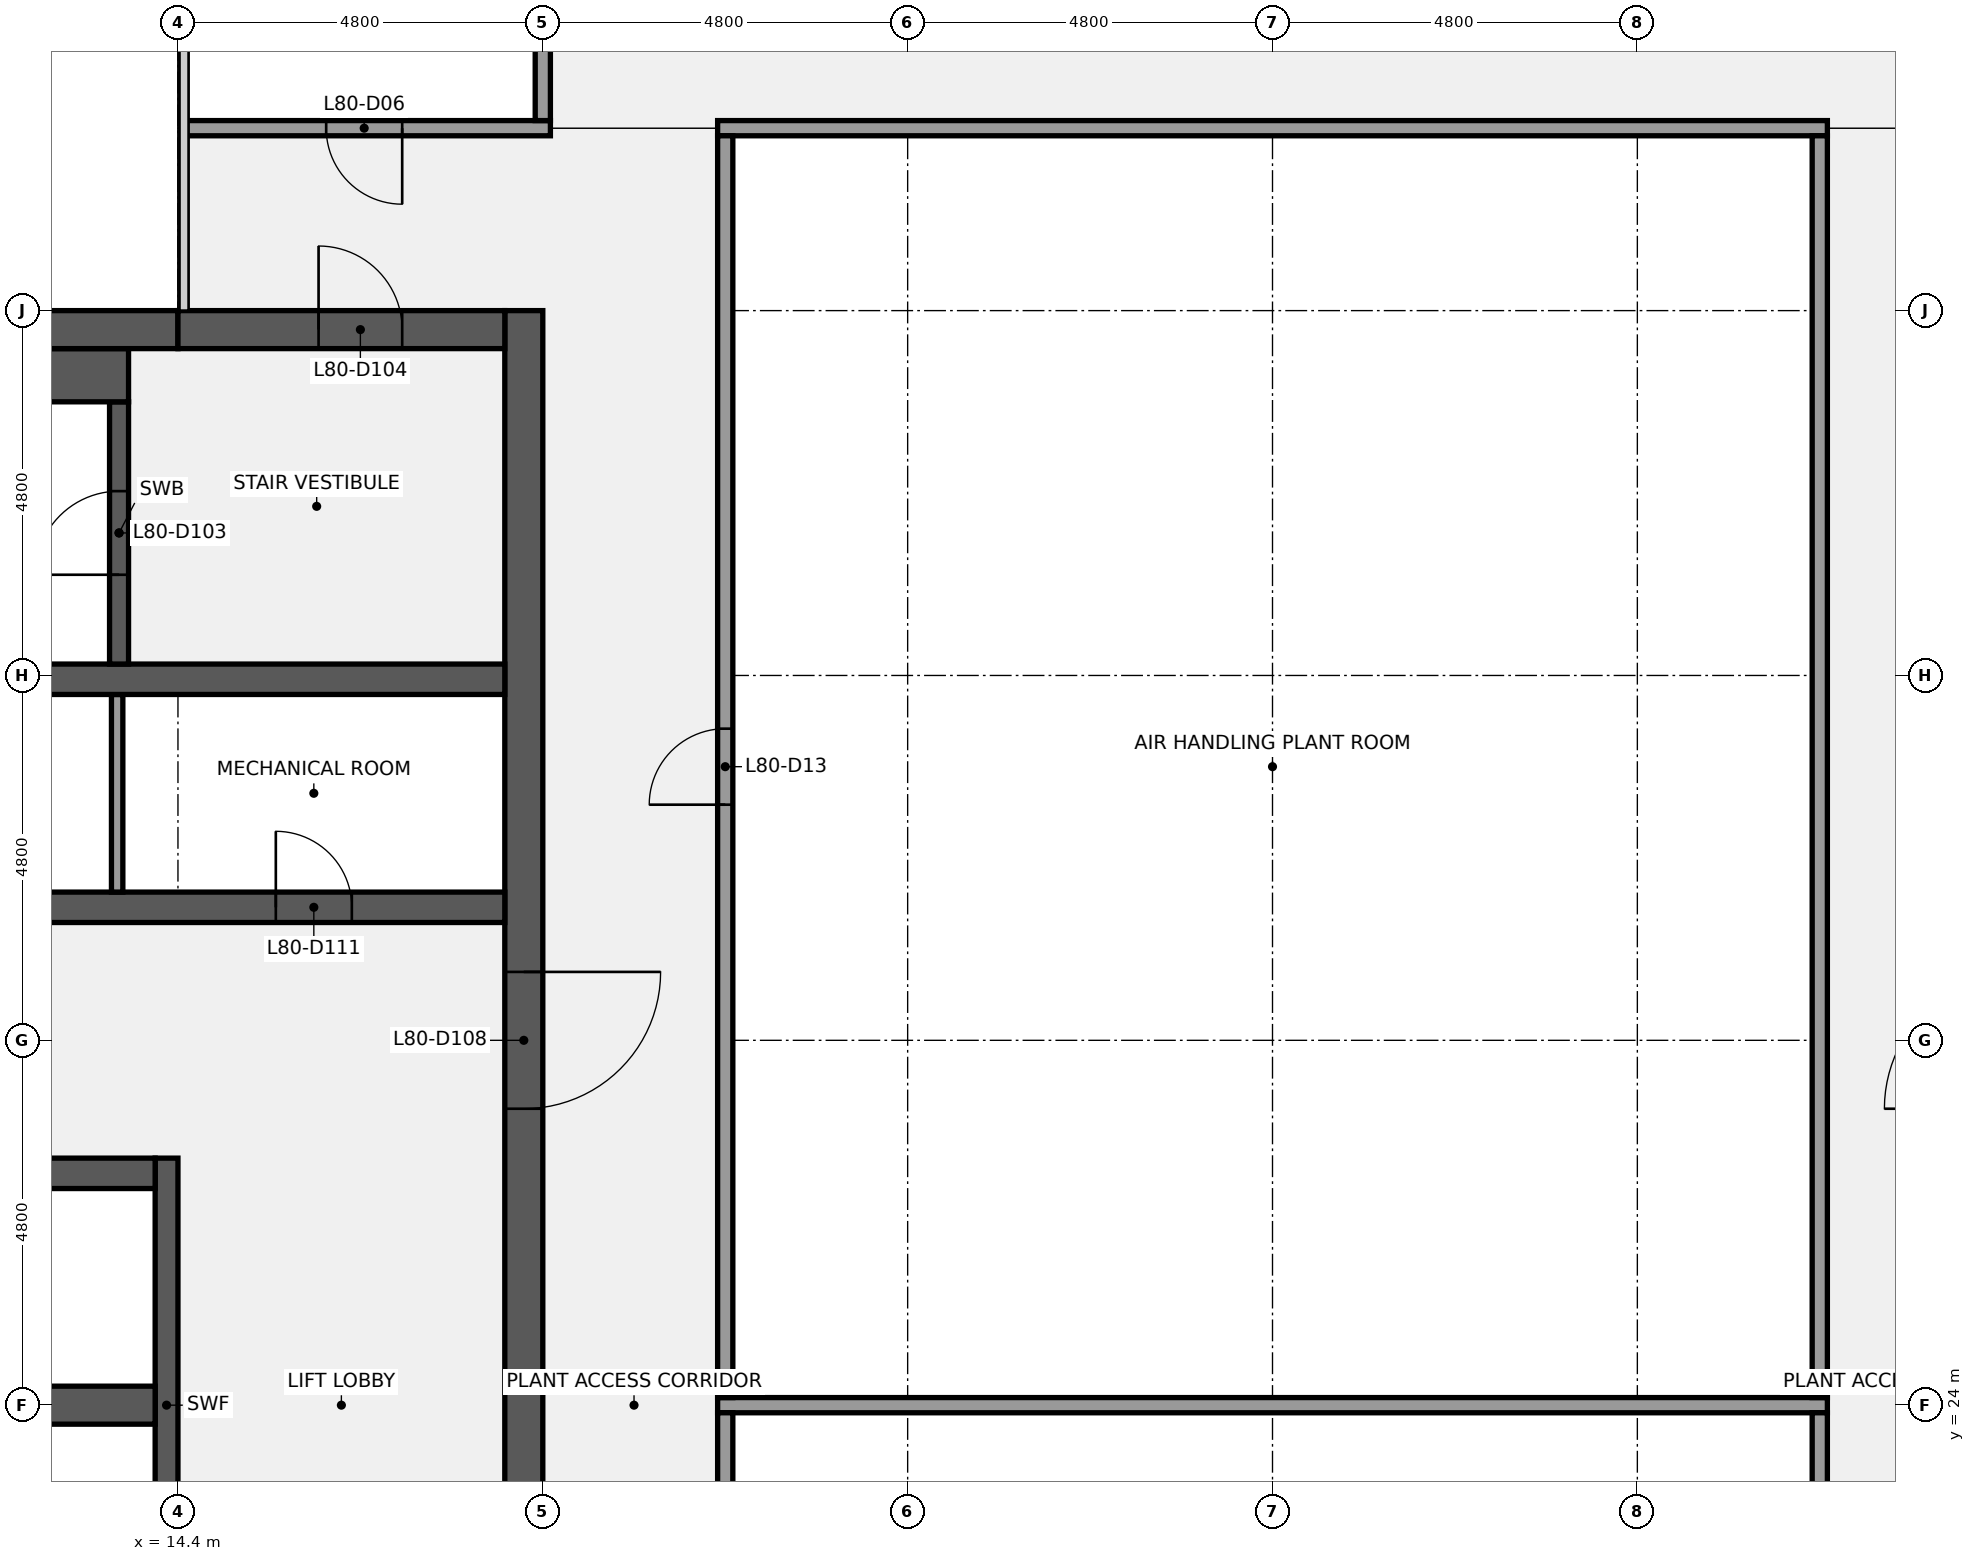
"""IFC4 building model, lengths in metres.
Left out: names, types, materials, properties, quantities, classifications, styles, units other than length and angle.
Written with IfcOpenShell. Run it as: python <this file> out.ifc"""

import sys

from ifc_helpers import new_model, si_unit, direction, frame, frame_2d, origin, place, context, subcontext, project, spatial, rectangle, extrude, element, fill, save


model = new_model("IFC4")
c1 = context("Model", 3, precision=1e-05, world=origin(), true_north=direction((0.0, 1.0)))
c2 = subcontext(c1, "Body", "Model", "MODEL_VIEW")
j1 = project(units=[si_unit("LENGTHUNIT", "METRE"), si_unit("PLANEANGLEUNIT", "RADIAN")], contexts=[c1])
p1 = place(None, origin())
s1 = spatial("IfcSite", under=j1, at=p1, CompositionType="ELEMENT")
p2 = place(p1, origin())
s2 = spatial("IfcBuilding", under=s1, at=p2, CompositionType="ELEMENT")
p3 = place(p2, frame((0.0, 0.0, 358.3)))
s3 = spatial("IfcBuildingStorey", under=s2, at=p3, CompositionType="ELEMENT", Elevation=358.3)
p4 = place(p3, frame((18.95, 38.4, 0.0), z_axis=(0.0, 0.0, 1.0), x_axis=(0.0, -1.0, 0.0)))
e1 = element("IfcWall", 1, at=p4, inside=s3, PredefinedType="SHEAR", context=c2, shape_type="SweptSolid", body=[
    extrude(rectangle(XDim=28.8, YDim=0.5, at=frame_2d((14.4, 0.0))), origin(), (0.0, 0.0, 1.0), 3.75),
])
p5 = place(p4, frame((18.3, 0.0, 0.0)))
e2 = element("IfcOpeningElement", 2, at=p5, cuts=e1, PredefinedType="OPENING", context=c2, shape_type="SweptSolid", body=[
    extrude(rectangle(XDim=1.8, YDim=2.1, at=frame_2d((0.9, 1.05))), frame((0.0, 0.26, 0.0), z_axis=(0.0, -1.0, 0.0), x_axis=(1.0, 0.0, 0.0)), (0.0, 0.0, 1.0), 0.52),
])
p6 = place(p4, frame((8.7, 0.0, 0.0)))
e3 = element("IfcOpeningElement", 3, at=p6, cuts=e1, PredefinedType="OPENING", context=c2, shape_type="SweptSolid", body=[
    extrude(rectangle(XDim=1.8, YDim=2.1, at=frame_2d((0.9, 1.05))), frame((0.0, 0.26, 0.0), z_axis=(0.0, -1.0, 0.0), x_axis=(1.0, 0.0, 0.0)), (0.0, 0.0, 1.0), 0.52),
])
p7 = place(p3, frame((14.25, 20.75, 0.0), z_axis=(0.0, 0.0, 1.0), x_axis=(0.0, 1.0, 0.0)))
e4 = element("IfcWall", 4, at=p7, inside=s3, PredefinedType="SHEAR", context=c2, shape_type="SweptSolid", body=[
    extrude(rectangle(XDim=6.5, YDim=0.3, at=frame_2d((3.25, 0.0))), origin(), (0.0, 0.0, 1.0), 3.75),
])
p8 = place(p3, frame((0.5, 24.0, 0.0), z_axis=(0.0, 0.0, 1.0), x_axis=(1.0, 0.0, 0.0)))
e5 = element("IfcWall", 5, at=p8, inside=s3, PredefinedType="SHEAR", context=c2, shape_type="SweptSolid", body=[
    extrude(rectangle(XDim=13.6, YDim=0.5, at=frame_2d((6.8, 0.0))), origin(), (0.0, 0.0, 1.0), 3.75),
])
p9 = place(p3, frame((0.5, 27.05, 0.0), z_axis=(0.0, 0.0, 1.0), x_axis=(1.0, 0.0, 0.0)))
e6 = element("IfcWall", 6, at=p9, inside=s3, PredefinedType="SHEAR", context=c2, shape_type="SweptSolid", body=[
    extrude(rectangle(XDim=13.6, YDim=0.4, at=frame_2d((6.8, 0.0))), origin(), (0.0, 0.0, 1.0), 3.75),
])
p10 = place(p9, frame((3.9, 0.0, 0.0)))
e7 = element("IfcOpeningElement", 7, at=p10, cuts=e6, PredefinedType="OPENING", context=c2, shape_type="SweptSolid", body=[
    extrude(rectangle(XDim=1.0, YDim=2.1, at=frame_2d((0.5, 1.05))), frame((0.0, 0.21, 0.0), z_axis=(0.0, -1.0, 0.0), x_axis=(1.0, 0.0, 0.0)), (0.0, 0.0, 1.0), 0.42),
])
p11 = place(p9, frame((10.9, 0.0, 0.0)))
e8 = element("IfcOpeningElement", 8, at=p11, cuts=e6, PredefinedType="OPENING", context=c2, shape_type="SweptSolid", body=[
    extrude(rectangle(XDim=1.2, YDim=2.1, at=frame_2d((0.6, 1.05))), frame((0.0, 0.21, 0.0), z_axis=(0.0, -1.0, 0.0), x_axis=(1.0, 0.0, 0.0)), (0.0, 0.0, 1.0), 0.42),
])
p12 = place(p3, frame((0.5, 30.55, 0.0), z_axis=(0.0, 0.0, 1.0), x_axis=(1.0, 0.0, 0.0)))
e9 = element("IfcWall", 9, at=p12, inside=s3, PredefinedType="SHEAR", context=c2, shape_type="SweptSolid", body=[
    extrude(rectangle(XDim=18.2, YDim=0.4, at=frame_2d((9.1, 0.0))), origin(), (0.0, 0.0, 1.0), 3.75),
])
p13 = place(p12, frame((3.613, 0.0, 0.0)))
e10 = element("IfcOpeningElement", 10, at=p13, cuts=e9, PredefinedType="OPENING", context=c2, shape_type="SweptSolid", body=[
    extrude(rectangle(XDim=1.0, YDim=2.1, at=frame_2d((0.5, 1.05))), frame((0.0, 0.21, 0.0), z_axis=(0.0, -1.0, 0.0), x_axis=(1.0, 0.0, 0.0)), (0.0, 0.0, 1.0), 0.42),
])
p14 = place(p12, frame((10.2, 0.0, 0.0)))
e11 = element("IfcOpeningElement", 11, at=p14, cuts=e9, PredefinedType="OPENING", context=c2, shape_type="SweptSolid", body=[
    extrude(rectangle(XDim=1.0, YDim=2.1, at=frame_2d((0.5, 1.05))), frame((0.0, 0.21, 0.0), z_axis=(0.0, -1.0, 0.0), x_axis=(1.0, 0.0, 0.0)), (0.0, 0.0, 1.0), 0.42),
])
p15 = place(p12, frame((15.188, 0.0, 0.0)))
e12 = element("IfcOpeningElement", 12, at=p15, cuts=e9, PredefinedType="OPENING", context=c2, shape_type="SweptSolid", body=[
    extrude(rectangle(XDim=1.0, YDim=2.1, at=frame_2d((0.5, 1.05))), frame((0.0, 0.21, 0.0), z_axis=(0.0, -1.0, 0.0), x_axis=(1.0, 0.0, 0.0)), (0.0, 0.0, 1.0), 0.42),
])
p16 = place(p3, frame((13.6, 30.75, 0.0), z_axis=(0.0, 0.0, 1.0), x_axis=(0.0, 1.0, 0.0)))
e13 = element("IfcWall", 13, at=p16, inside=s3, PredefinedType="PARTITIONING", context=c2, shape_type="SweptSolid", body=[
    extrude(rectangle(XDim=2.6, YDim=0.15, at=frame_2d((1.3, 0.0))), origin(), (0.0, 0.0, 1.0), 3.75),
])
p17 = place(p3, frame((0.5, 33.55, 0.0), z_axis=(0.0, 0.0, 1.0), x_axis=(1.0, 0.0, 0.0)))
e14 = element("IfcWall", 14, at=p17, inside=s3, PredefinedType="SHEAR", context=c2, shape_type="SweptSolid", body=[
    extrude(rectangle(XDim=18.2, YDim=0.4, at=frame_2d((9.1, 0.0))), origin(), (0.0, 0.0, 1.0), 3.75),
])
p18 = place(p3, frame((13.625, 33.75, 0.0), z_axis=(0.0, 0.0, 1.0), x_axis=(0.0, 1.0, 0.0)))
e15 = element("IfcWall", 15, at=p18, inside=s3, PredefinedType="SHEAR", context=c2, shape_type="SweptSolid", body=[
    extrude(rectangle(XDim=3.45, YDim=0.25, at=frame_2d((1.725, 0.0))), origin(), (0.0, 0.0, 1.0), 3.75),
])
p19 = place(p18, frame((1.175, 0.0, 0.0)))
e16 = element("IfcOpeningElement", 16, at=p19, cuts=e15, PredefinedType="OPENING", context=c2, shape_type="SweptSolid", body=[
    extrude(rectangle(XDim=1.1, YDim=2.1, at=frame_2d((0.55, 1.05))), frame((0.0, 0.135, 0.0), z_axis=(0.0, -1.0, 0.0), x_axis=(1.0, 0.0, 0.0)), (0.0, 0.0, 1.0), 0.27),
])
p20 = place(p3, frame((6.25, 37.55, 0.0), z_axis=(0.0, 0.0, 1.0), x_axis=(1.0, 0.0, 0.0)))
e17 = element("IfcWall", 17, at=p20, inside=s3, PredefinedType="SHEAR", context=c2, shape_type="SweptSolid", body=[
    extrude(rectangle(XDim=7.5, YDim=0.7, at=frame_2d((3.75, 0.0))), origin(), (0.0, 0.0, 1.0), 3.75),
])
p21 = place(p3, frame((0.5, 38.15, 0.0), z_axis=(0.0, 0.0, 1.0), x_axis=(1.0, 0.0, 0.0)))
e18 = element("IfcWall", 18, at=p21, inside=s3, PredefinedType="SHEAR", context=c2, shape_type="SweptSolid", body=[
    extrude(rectangle(XDim=13.9, YDim=0.5, at=frame_2d((6.95, 0.0))), origin(), (0.0, 0.0, 1.0), 3.75),
])
p22 = place(p3, frame((14.4, 38.15, 0.0), z_axis=(0.0, 0.0, 1.0), x_axis=(1.0, 0.0, 0.0)))
e19 = element("IfcWall", 19, at=p22, inside=s3, PredefinedType="SHEAR", context=c2, shape_type="SweptSolid", body=[
    extrude(rectangle(XDim=4.3, YDim=0.5, at=frame_2d((2.15, 0.0))), origin(), (0.0, 0.0, 1.0), 3.75),
])
p23 = place(p22, frame((1.85, 0.0, 0.0)))
e20 = element("IfcOpeningElement", 20, at=p23, cuts=e19, PredefinedType="OPENING", context=c2, shape_type="SweptSolid", body=[
    extrude(rectangle(XDim=1.1, YDim=2.1, at=frame_2d((0.55, 1.05))), frame((0.0, 0.26, 0.0), z_axis=(0.0, -1.0, 0.0), x_axis=(1.0, 0.0, 0.0)), (0.0, 0.0, 1.0), 0.52),
])
p24 = place(p3, frame((21.5, 24.0, 0.0), z_axis=(0.0, 0.0, 1.0), x_axis=(1.0, 0.0, 0.0)))
e21 = element("IfcWall", 21, at=p24, inside=s3, PredefinedType="PARTITIONING", context=c2, shape_type="SweptSolid", body=[
    extrude(rectangle(XDim=14.6, YDim=0.2, at=frame_2d((7.3, 0.0))), origin(), (0.0, 0.0, 1.0), 2.759),
])
p25 = place(p3, frame((14.5, 40.8, 0.0), z_axis=(0.0, 0.0, 1.0), x_axis=(1.0, 0.0, 0.0)))
e22 = element("IfcWall", 22, at=p25, inside=s3, PredefinedType="PARTITIONING", context=c2, shape_type="SweptSolid", body=[
    extrude(rectangle(XDim=4.8, YDim=0.2, at=frame_2d((2.4, 0.0))), origin(), (0.0, 0.0, 1.0), 2.759),
])
p26 = place(p25, frame((1.85, 0.0, 0.0)))
e23 = element("IfcOpeningElement", 23, at=p26, cuts=e22, PredefinedType="OPENING", context=c2, shape_type="SweptSolid", body=[
    extrude(rectangle(XDim=1.0, YDim=2.1, at=frame_2d((0.5, 1.05))), frame((0.0, 0.11, 0.0), z_axis=(0.0, -1.0, 0.0), x_axis=(1.0, 0.0, 0.0)), (0.0, 0.0, 1.0), 0.22),
])
p27 = place(p3, frame((21.5, 40.8, 0.0), z_axis=(0.0, 0.0, 1.0), x_axis=(1.0, 0.0, 0.0)))
e24 = element("IfcWall", 24, at=p27, inside=s3, PredefinedType="PARTITIONING", context=c2, shape_type="SweptSolid", body=[
    extrude(rectangle(XDim=14.6, YDim=0.2, at=frame_2d((7.3, 0.0))), origin(), (0.0, 0.0, 1.0), 2.759),
])
p28 = place(p3, frame((19.2, 40.9, 0.0), z_axis=(0.0, 0.0, 1.0), x_axis=(0.0, 1.0, 0.0)))
e25 = element("IfcWall", 25, at=p28, inside=s3, PredefinedType="PARTITIONING", context=c2, shape_type="SweptSolid", body=[
    extrude(rectangle(XDim=2.2, YDim=0.2, at=frame_2d((1.1, 0.0))), origin(), (0.0, 0.0, 1.0), 2.759),
])
p29 = place(p3, frame((21.6, 14.5, 0.0), z_axis=(0.0, 0.0, 1.0), x_axis=(0.0, 1.0, 0.0)))
e26 = element("IfcWall", 26, at=p29, inside=s3, PredefinedType="PARTITIONING", context=c2, shape_type="SweptSolid", body=[
    extrude(rectangle(XDim=9.4, YDim=0.2, at=frame_2d((4.7, 0.0))), origin(), (0.0, 0.0, 1.0), 2.759),
])
p30 = place(p29, frame((4.2, 0.0, 0.0)))
e27 = element("IfcOpeningElement", 27, at=p30, cuts=e26, PredefinedType="OPENING", context=c2, shape_type="SweptSolid", body=[
    extrude(rectangle(XDim=1.0, YDim=2.1, at=frame_2d((0.5, 1.05))), frame((0.0, 0.11, 0.0), z_axis=(0.0, -1.0, 0.0), x_axis=(1.0, 0.0, 0.0)), (0.0, 0.0, 1.0), 0.22),
])
p31 = place(p3, frame((21.6, 24.1, 0.0), z_axis=(0.0, 0.0, 1.0), x_axis=(0.0, 1.0, 0.0)))
e28 = element("IfcWall", 28, at=p31, inside=s3, PredefinedType="PARTITIONING", context=c2, shape_type="SweptSolid", body=[
    extrude(rectangle(XDim=16.6, YDim=0.2, at=frame_2d((8.3, 0.0))), origin(), (0.0, 0.0, 1.0), 2.759),
])
p32 = place(p31, frame((7.8, 0.0, 0.0)))
e29 = element("IfcOpeningElement", 29, at=p32, cuts=e28, PredefinedType="OPENING", context=c2, shape_type="SweptSolid", body=[
    extrude(rectangle(XDim=1.0, YDim=2.1, at=frame_2d((0.5, 1.05))), frame((0.0, 0.11, 0.0), z_axis=(0.0, -1.0, 0.0), x_axis=(1.0, 0.0, 0.0)), (0.0, 0.0, 1.0), 0.22),
])
p33 = place(p3, frame((36.0, 14.5, 0.0), z_axis=(0.0, 0.0, 1.0), x_axis=(0.0, 1.0, 0.0)))
e30 = element("IfcWall", 30, at=p33, inside=s3, PredefinedType="PARTITIONING", context=c2, shape_type="SweptSolid", body=[
    extrude(rectangle(XDim=9.4, YDim=0.2, at=frame_2d((4.7, 0.0))), origin(), (0.0, 0.0, 1.0), 2.759),
])
p34 = place(p3, frame((36.0, 24.1, 0.0), z_axis=(0.0, 0.0, 1.0), x_axis=(0.0, 1.0, 0.0)))
e31 = element("IfcWall", 31, at=p34, inside=s3, PredefinedType="PARTITIONING", context=c2, shape_type="SweptSolid", body=[
    extrude(rectangle(XDim=16.6, YDim=0.2, at=frame_2d((8.3, 0.0))), origin(), (0.0, 0.0, 1.0), 2.759),
])
p35 = place(p19, origin())
e32 = element("IfcDoor", 32, at=p35, inside=s3, OperationType="SINGLE_SWING_LEFT", PredefinedType="DOOR", context=c2, shape_type="SweptSolid", body=[
    extrude(rectangle(XDim=1.1, YDim=2.1, at=frame_2d((0.55, 1.05))), frame((0.0, 0.025, 0.0), z_axis=(0.0, -1.0, 0.0), x_axis=(1.0, 0.0, 0.0)), (0.0, 0.0, 1.0), 0.05),
])
fill(e16, e32)
p36 = place(p23, origin())
e33 = element("IfcDoor", 33, at=p36, inside=s3, OperationType="SINGLE_SWING_LEFT", PredefinedType="DOOR", context=c2, shape_type="SweptSolid", body=[
    extrude(rectangle(XDim=1.1, YDim=2.1, at=frame_2d((0.55, 1.05))), frame((0.0, 0.025, 0.0), z_axis=(0.0, -1.0, 0.0), x_axis=(1.0, 0.0, 0.0)), (0.0, 0.0, 1.0), 0.05),
])
fill(e20, e33)
p37 = place(p6, origin())
e34 = element("IfcDoor", 34, at=p37, inside=s3, OperationType="DOUBLE_DOOR_SINGLE_SWING", PredefinedType="DOOR", context=c2, shape_type="SweptSolid", body=[
    extrude(rectangle(XDim=1.8, YDim=2.1, at=frame_2d((0.9, 1.05))), frame((0.0, 0.025, 0.0), z_axis=(0.0, -1.0, 0.0), x_axis=(1.0, 0.0, 0.0)), (0.0, 0.0, 1.0), 0.05),
])
fill(e3, e34)
p38 = place(p15, origin())
e35 = element("IfcDoor", 35, at=p38, inside=s3, OperationType="SINGLE_SWING_LEFT", PredefinedType="DOOR", context=c2, shape_type="SweptSolid", body=[
    extrude(rectangle(XDim=1.0, YDim=2.1, at=frame_2d((0.5, 1.05))), frame((0.0, 0.025, 0.0), z_axis=(0.0, -1.0, 0.0), x_axis=(1.0, 0.0, 0.0)), (0.0, 0.0, 1.0), 0.05),
])
fill(e12, e35)
p39 = place(p26, origin())
e36 = element("IfcDoor", 36, at=p39, inside=s3, OperationType="SINGLE_SWING_RIGHT", PredefinedType="DOOR", context=c2, shape_type="SweptSolid", body=[
    extrude(rectangle(XDim=1.0, YDim=2.1, at=frame_2d((0.5, 1.05))), frame((0.0, 0.025, 0.0), z_axis=(0.0, -1.0, 0.0), x_axis=(1.0, 0.0, 0.0)), (0.0, 0.0, 1.0), 0.05),
])
fill(e23, e36)
p40 = place(p32, origin())
e37 = element("IfcDoor", 37, at=p40, inside=s3, OperationType="SINGLE_SWING_LEFT", PredefinedType="DOOR", context=c2, shape_type="SweptSolid", body=[
    extrude(rectangle(XDim=1.0, YDim=2.1, at=frame_2d((0.5, 1.05))), frame((0.0, 0.025, 0.0), z_axis=(0.0, -1.0, 0.0), x_axis=(1.0, 0.0, 0.0)), (0.0, 0.0, 1.0), 0.05),
])
fill(e29, e37)
save(model, sys.argv[1])
